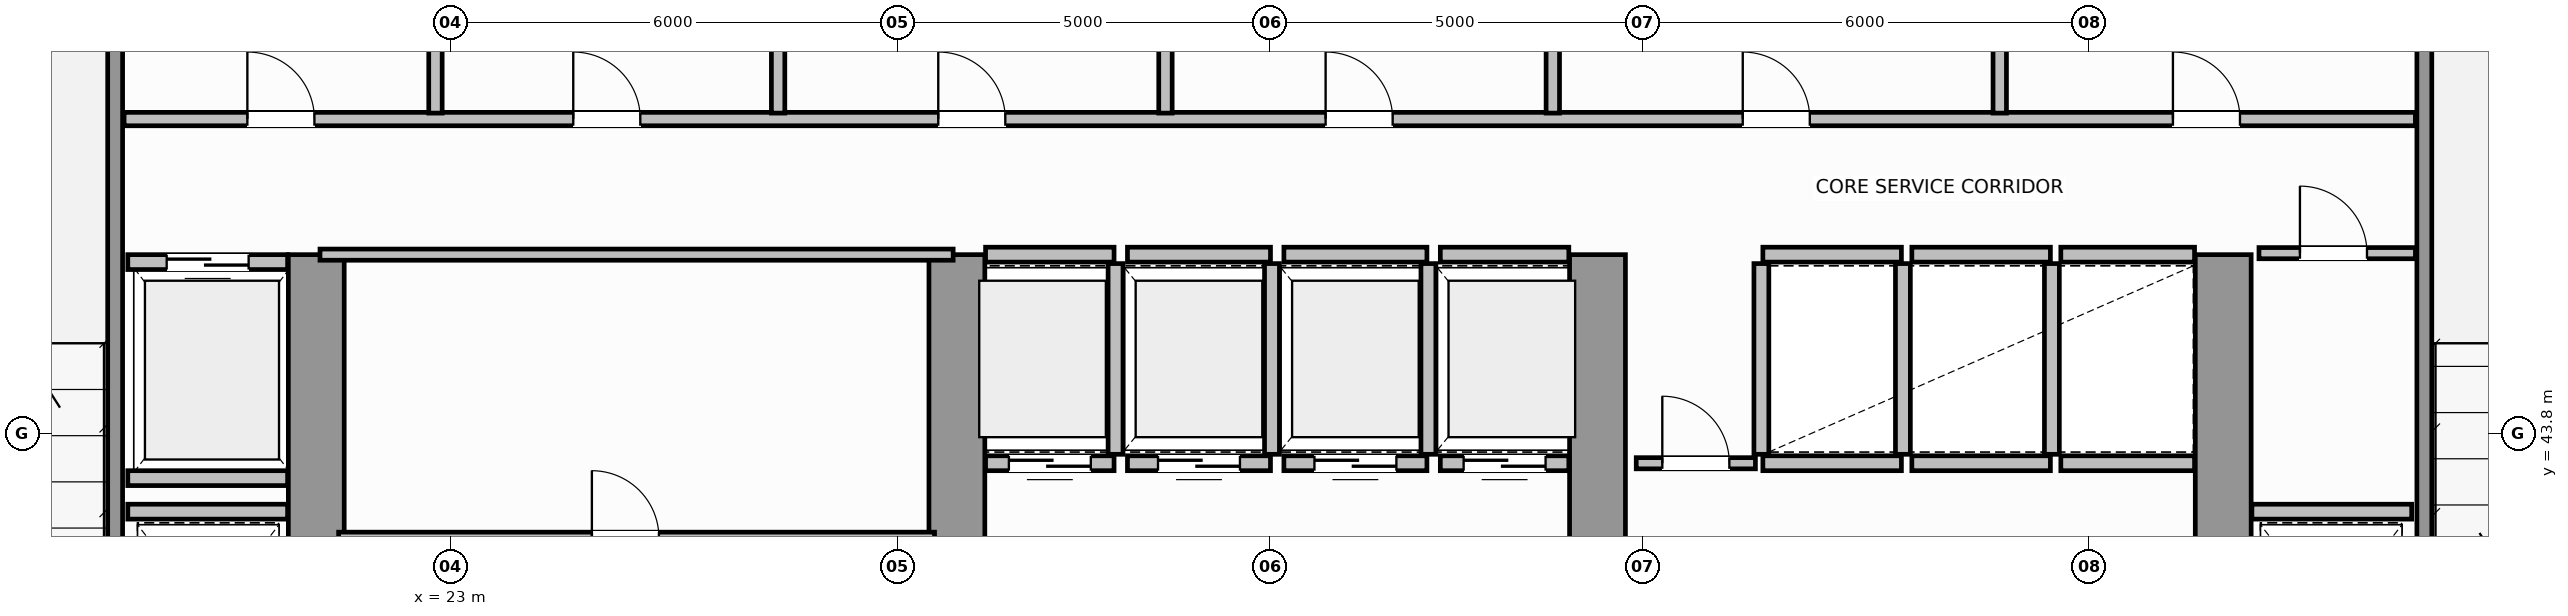
"""IFC4 building model, lengths in metres.
Left out: names, types, materials, properties, quantities, classifications, styles, units other than length and angle.
Written with IfcOpenShell. Run it as: python <this file> out.ifc"""

import sys

from ifc_helpers import new_model, si_unit, direction, frame, frame_2d, origin, place, context, subcontext, project, spatial, rectangle, extrude, source, transform, mapped, element, fill, save


model = new_model("IFC4")
c1 = context("Model", 3, precision=1e-05, world=origin(), true_north=direction((0.0, 1.0)))
c2 = subcontext(c1, "Body", "Model", "MODEL_VIEW")
j1 = project(units=[si_unit("LENGTHUNIT", "METRE"), si_unit("PLANEANGLEUNIT", "RADIAN")], contexts=[c1])
p1 = place(None, origin())
s1 = spatial("IfcSite", under=j1, at=p1, CompositionType="ELEMENT")
p2 = place(p1, origin())
s2 = spatial("IfcBuilding", under=s1, at=p2, CompositionType="ELEMENT")
p3 = place(p2, frame((0.0, 0.0, 141.4)))
s3 = spatial("IfcBuildingStorey", under=s2, at=p3, CompositionType="ELEMENT", Elevation=141.4)
for number, where, z_axis, x_axis in (
    (1, (21.2, 36.895, 0.0), (0.0, 0.0, 1.0), (0.0, 1.0, 0.0)),
    (2, (29.8, 36.895, 0.0), (0.0, 0.0, 1.0), (0.0, 1.0, 0.0)),
    (3, (38.4, 36.895, 0.0), (0.0, 0.0, 1.0), (0.0, 1.0, 0.0)),
    (4, (46.8, 36.895, 0.0), (0.0, 0.0, 1.0), (0.0, 1.0, 0.0)),
):
    element("IfcWall", number, at=place(p3, frame(where, z_axis=z_axis, x_axis=x_axis)), inside=s3, PredefinedType="SHEAR", context=c2, shape_type="SweptSolid", body=[
        extrude(rectangle(XDim=9.305, YDim=0.75, at=frame_2d((4.652, 0.0))), origin(), (0.0, 0.0, 1.0), 3.8),
    ])
for number, where, z_axis, x_axis in (
    (5, (18.5, 39.96, 0.0), (0.0, 0.0, 1.0), (0.0, 1.0, 0.0)),
    (6, (49.5, 39.96, 0.0), (0.0, 0.0, 1.0), (0.0, 1.0, 0.0)),
):
    element("IfcWall", number, at=place(p3, frame(where, z_axis=z_axis, x_axis=x_axis)), inside=s3, PredefinedType="SOLIDWALL", context=c2, shape_type="SweptSolid", body=[
        extrude(rectangle(XDim=9.93, YDim=0.2, at=frame_2d((4.965, 0.0))), origin(), (0.0, 0.0, 1.0), 3.8),
    ])
p4 = place(p3, frame((30.185, 43.4, 0.0), z_axis=(0.0, 0.0, 1.0), x_axis=(1.0, 0.0, 0.0)))
e7 = element("IfcWall", 7, at=p4, inside=s3, PredefinedType="SOLIDWALL", context=c2, shape_type="SweptSolid", body=[
    extrude(rectangle(XDim=1.725, YDim=0.2, at=frame_2d((0.862, 0.0))), origin(), (0.0, 0.0, 1.0), 3.58),
])
p5 = place(p4, frame((0.313, 0.0, 0.0)))
e8 = element("IfcOpeningElement", 8, at=p5, cuts=e7, PredefinedType="OPENING", context=c2, shape_type="SweptSolid", body=[
    extrude(rectangle(XDim=1.1, YDim=2.15, at=frame_2d((0.55, 1.075))), frame((0.0, 0.11, 0.0), z_axis=(0.0, -1.0, 0.0), x_axis=(1.0, 0.0, 0.0)), (0.0, 0.0, 1.0), 0.22),
])
p6 = place(p3, frame((30.185, 46.2, 0.0), z_axis=(0.0, 0.0, 1.0), x_axis=(1.0, 0.0, 0.0)))
e9 = element("IfcWall", 9, at=p6, inside=s3, PredefinedType="SOLIDWALL", context=c2, shape_type="SweptSolid", body=[
    extrude(rectangle(XDim=1.725, YDim=0.2, at=frame_2d((0.862, 0.0))), origin(), (0.0, 0.0, 1.0), 3.58),
])
p7 = place(p3, frame((31.93, 43.52, 0.0), z_axis=(0.0, 0.0, 1.0), x_axis=(0.0, 1.0, 0.0)))
e10 = element("IfcWall", 10, at=p7, inside=s3, PredefinedType="SOLIDWALL", context=c2, shape_type="SweptSolid", body=[
    extrude(rectangle(XDim=2.56, YDim=0.2, at=frame_2d((1.28, 0.0))), origin(), (0.0, 0.0, 1.0), 3.58),
])
p8 = place(p3, frame((32.09, 43.4, 0.0), z_axis=(0.0, 0.0, 1.0), x_axis=(1.0, 0.0, 0.0)))
e11 = element("IfcWall", 11, at=p8, inside=s3, PredefinedType="SOLIDWALL", context=c2, shape_type="SweptSolid", body=[
    extrude(rectangle(XDim=1.92, YDim=0.2, at=frame_2d((0.96, 0.0))), origin(), (0.0, 0.0, 1.0), 3.58),
])
p9 = place(p8, frame((0.41, 0.0, 0.0)))
e12 = element("IfcOpeningElement", 12, at=p9, cuts=e11, PredefinedType="OPENING", context=c2, shape_type="SweptSolid", body=[
    extrude(rectangle(XDim=1.1, YDim=2.15, at=frame_2d((0.55, 1.075))), frame((0.0, 0.11, 0.0), z_axis=(0.0, -1.0, 0.0), x_axis=(1.0, 0.0, 0.0)), (0.0, 0.0, 1.0), 0.22),
])
p10 = place(p3, frame((32.09, 46.2, 0.0), z_axis=(0.0, 0.0, 1.0), x_axis=(1.0, 0.0, 0.0)))
e13 = element("IfcWall", 13, at=p10, inside=s3, PredefinedType="SOLIDWALL", context=c2, shape_type="SweptSolid", body=[
    extrude(rectangle(XDim=1.92, YDim=0.2, at=frame_2d((0.96, 0.0))), origin(), (0.0, 0.0, 1.0), 3.58),
])
p11 = place(p3, frame((34.03, 43.52, 0.0), z_axis=(0.0, 0.0, 1.0), x_axis=(0.0, 1.0, 0.0)))
e14 = element("IfcWall", 14, at=p11, inside=s3, PredefinedType="SOLIDWALL", context=c2, shape_type="SweptSolid", body=[
    extrude(rectangle(XDim=2.56, YDim=0.2, at=frame_2d((1.28, 0.0))), origin(), (0.0, 0.0, 1.0), 3.58),
])
p12 = place(p3, frame((34.19, 43.4, 0.0), z_axis=(0.0, 0.0, 1.0), x_axis=(1.0, 0.0, 0.0)))
e15 = element("IfcWall", 15, at=p12, inside=s3, PredefinedType="SOLIDWALL", context=c2, shape_type="SweptSolid", body=[
    extrude(rectangle(XDim=1.92, YDim=0.2, at=frame_2d((0.96, 0.0))), origin(), (0.0, 0.0, 1.0), 3.58),
])
p13 = place(p12, frame((0.41, 0.0, 0.0)))
e16 = element("IfcOpeningElement", 16, at=p13, cuts=e15, PredefinedType="OPENING", context=c2, shape_type="SweptSolid", body=[
    extrude(rectangle(XDim=1.1, YDim=2.15, at=frame_2d((0.55, 1.075))), frame((0.0, 0.11, 0.0), z_axis=(0.0, -1.0, 0.0), x_axis=(1.0, 0.0, 0.0)), (0.0, 0.0, 1.0), 0.22),
])
p14 = place(p3, frame((34.19, 46.2, 0.0), z_axis=(0.0, 0.0, 1.0), x_axis=(1.0, 0.0, 0.0)))
e17 = element("IfcWall", 17, at=p14, inside=s3, PredefinedType="SOLIDWALL", context=c2, shape_type="SweptSolid", body=[
    extrude(rectangle(XDim=1.92, YDim=0.2, at=frame_2d((0.96, 0.0))), origin(), (0.0, 0.0, 1.0), 3.58),
])
p15 = place(p3, frame((36.13, 43.52, 0.0), z_axis=(0.0, 0.0, 1.0), x_axis=(0.0, 1.0, 0.0)))
e18 = element("IfcWall", 18, at=p15, inside=s3, PredefinedType="SOLIDWALL", context=c2, shape_type="SweptSolid", body=[
    extrude(rectangle(XDim=2.56, YDim=0.2, at=frame_2d((1.28, 0.0))), origin(), (0.0, 0.0, 1.0), 3.58),
])
p16 = place(p3, frame((36.29, 43.4, 0.0), z_axis=(0.0, 0.0, 1.0), x_axis=(1.0, 0.0, 0.0)))
e19 = element("IfcWall", 19, at=p16, inside=s3, PredefinedType="SOLIDWALL", context=c2, shape_type="SweptSolid", body=[
    extrude(rectangle(XDim=1.725, YDim=0.2, at=frame_2d((0.862, 0.0))), origin(), (0.0, 0.0, 1.0), 3.58),
])
p17 = place(p16, frame((0.313, 0.0, 0.0)))
e20 = element("IfcOpeningElement", 20, at=p17, cuts=e19, PredefinedType="OPENING", context=c2, shape_type="SweptSolid", body=[
    extrude(rectangle(XDim=1.1, YDim=2.15, at=frame_2d((0.55, 1.075))), frame((0.0, 0.11, 0.0), z_axis=(0.0, -1.0, 0.0), x_axis=(1.0, 0.0, 0.0)), (0.0, 0.0, 1.0), 0.22),
])
p18 = place(p3, frame((36.29, 46.2, 0.0), z_axis=(0.0, 0.0, 1.0), x_axis=(1.0, 0.0, 0.0)))
e21 = element("IfcWall", 21, at=p18, inside=s3, PredefinedType="SOLIDWALL", context=c2, shape_type="SweptSolid", body=[
    extrude(rectangle(XDim=1.725, YDim=0.2, at=frame_2d((0.862, 0.0))), origin(), (0.0, 0.0, 1.0), 3.58),
])
for number, where, z_axis, x_axis in (
    (22, (40.62, 43.4, 0.0), (0.0, 0.0, 1.0), (1.0, 0.0, 0.0)),
    (23, (40.62, 46.2, 0.0), (0.0, 0.0, 1.0), (1.0, 0.0, 0.0)),
):
    element("IfcWall", number, at=place(p3, frame(where, z_axis=z_axis, x_axis=x_axis)), inside=s3, PredefinedType="SOLIDWALL", context=c2, shape_type="SweptSolid", body=[
        extrude(rectangle(XDim=1.86, YDim=0.2, at=frame_2d((0.93, 0.0))), origin(), (0.0, 0.0, 1.0), 3.58),
    ])
for number, where, z_axis, x_axis in (
    (24, (40.6, 43.52, 0.0), (0.0, 0.0, 1.0), (0.0, 1.0, 0.0)),
    (25, (42.5, 43.52, 0.0), (0.0, 0.0, 1.0), (0.0, 1.0, 0.0)),
):
    element("IfcWall", number, at=place(p3, frame(where, z_axis=z_axis, x_axis=x_axis)), inside=s3, PredefinedType="SOLIDWALL", context=c2, shape_type="SweptSolid", body=[
        extrude(rectangle(XDim=2.56, YDim=0.2, at=frame_2d((1.28, 0.0))), origin(), (0.0, 0.0, 1.0), 3.58),
    ])
for number, where, z_axis, x_axis in (
    (26, (42.62, 43.4, 0.0), (0.0, 0.0, 1.0), (1.0, 0.0, 0.0)),
    (27, (42.62, 46.2, 0.0), (0.0, 0.0, 1.0), (1.0, 0.0, 0.0)),
):
    element("IfcWall", number, at=place(p3, frame(where, z_axis=z_axis, x_axis=x_axis)), inside=s3, PredefinedType="SOLIDWALL", context=c2, shape_type="SweptSolid", body=[
        extrude(rectangle(XDim=1.86, YDim=0.2, at=frame_2d((0.93, 0.0))), origin(), (0.0, 0.0, 1.0), 3.58),
    ])
p19 = place(p3, frame((44.5, 43.52, 0.0), z_axis=(0.0, 0.0, 1.0), x_axis=(0.0, 1.0, 0.0)))
e28 = element("IfcWall", 28, at=p19, inside=s3, PredefinedType="SOLIDWALL", context=c2, shape_type="SweptSolid", body=[
    extrude(rectangle(XDim=2.56, YDim=0.2, at=frame_2d((1.28, 0.0))), origin(), (0.0, 0.0, 1.0), 3.58),
])
for number, where, z_axis, x_axis in (
    (29, (44.62, 43.4, 0.0), (0.0, 0.0, 1.0), (1.0, 0.0, 0.0)),
    (30, (44.62, 46.2, 0.0), (0.0, 0.0, 1.0), (1.0, 0.0, 0.0)),
):
    element("IfcWall", number, at=place(p3, frame(where, z_axis=z_axis, x_axis=x_axis)), inside=s3, PredefinedType="SOLIDWALL", context=c2, shape_type="SweptSolid", body=[
        extrude(rectangle(XDim=1.795, YDim=0.2, at=frame_2d((0.897, 0.0))), origin(), (0.0, 0.0, 1.0), 3.58),
    ])
p20 = place(p3, frame((18.67, 46.1, 0.0), z_axis=(0.0, 0.0, 1.0), x_axis=(1.0, 0.0, 0.0)))
e31 = element("IfcWall", 31, at=p20, inside=s3, PredefinedType="SOLIDWALL", context=c2, shape_type="SweptSolid", body=[
    extrude(rectangle(XDim=2.145, YDim=0.2, at=frame_2d((1.073, 0.0))), origin(), (0.0, 0.0, 1.0), 3.58),
])
p21 = place(p20, frame((0.522, 0.0, 0.0)))
e32 = element("IfcOpeningElement", 32, at=p21, cuts=e31, PredefinedType="OPENING", context=c2, shape_type="SweptSolid", body=[
    extrude(rectangle(XDim=1.1, YDim=2.15, at=frame_2d((0.55, 1.075))), frame((0.0, 0.11, 0.0), z_axis=(0.0, -1.0, 0.0), x_axis=(1.0, 0.0, 0.0)), (0.0, 0.0, 1.0), 0.22),
])
for number, where, z_axis, x_axis in (
    (33, (18.67, 43.2, 0.0), (0.0, 0.0, 1.0), (1.0, 0.0, 0.0)),
    (34, (18.67, 42.75, 0.0), (0.0, 0.0, 1.0), (1.0, 0.0, 0.0)),
    (35, (47.185, 42.75, 0.0), (0.0, 0.0, 1.0), (1.0, 0.0, 0.0)),
):
    element("IfcWall", number, at=place(p3, frame(where, z_axis=z_axis, x_axis=x_axis)), inside=s3, PredefinedType="SOLIDWALL", context=c2, shape_type="SweptSolid", body=[
        extrude(rectangle(XDim=2.145, YDim=0.2, at=frame_2d((1.073, 0.0))), origin(), (0.0, 0.0, 1.0), 3.58),
    ])
p22 = place(p3, frame((21.25, 46.2, 0.0), z_axis=(0.0, 0.0, 1.0), x_axis=(1.0, 0.0, 0.0)))
e36 = element("IfcWall", 36, at=p22, inside=s3, PredefinedType="PARTITIONING", context=c2, shape_type="SweptSolid", body=[
    extrude(rectangle(XDim=8.5, YDim=0.15, at=frame_2d((4.25, 0.0))), origin(), (0.0, 0.0, 1.0), 3.58),
])
p23 = place(p3, frame((21.5, 42.4, 0.0), z_axis=(0.0, 0.0, 1.0), x_axis=(1.0, 0.0, 0.0)))
e37 = element("IfcWall", 37, at=p23, inside=s3, PredefinedType="PARTITIONING", context=c2, shape_type="SweptSolid", body=[
    extrude(rectangle(XDim=8.0, YDim=0.15, at=frame_2d((4.0, 0.0))), origin(), (0.0, 0.0, 1.0), 3.58),
])
p24 = place(p23, frame((3.4, 0.0, 0.0)))
e38 = element("IfcOpeningElement", 38, at=p24, cuts=e37, PredefinedType="OPENING", context=c2, shape_type="SweptSolid", body=[
    extrude(rectangle(XDim=0.9, YDim=2.1, at=frame_2d((0.45, 1.05))), frame((0.0, 0.085, 0.0), z_axis=(0.0, -1.0, 0.0), x_axis=(1.0, 0.0, 0.0)), (0.0, 0.0, 1.0), 0.17),
])
p25 = place(p3, frame((47.28, 46.22, 0.0), z_axis=(0.0, 0.0, 1.0), x_axis=(1.0, 0.0, 0.0)))
e39 = element("IfcWall", 39, at=p25, inside=s3, PredefinedType="PARTITIONING", context=c2, shape_type="SweptSolid", body=[
    extrude(rectangle(XDim=2.1, YDim=0.15, at=frame_2d((1.05, 0.0))), origin(), (0.0, 0.0, 1.0), 3.58),
])
p26 = place(p25, frame((0.55, 0.0, 0.0)))
e40 = element("IfcOpeningElement", 40, at=p26, cuts=e39, PredefinedType="OPENING", context=c2, shape_type="SweptSolid", body=[
    extrude(rectangle(XDim=0.9, YDim=2.1, at=frame_2d((0.45, 1.05))), frame((0.0, 0.085, 0.0), z_axis=(0.0, -1.0, 0.0), x_axis=(1.0, 0.0, 0.0)), (0.0, 0.0, 1.0), 0.17),
])
p27 = place(p3, frame((38.92, 43.4, 0.0), z_axis=(0.0, 0.0, 1.0), x_axis=(1.0, 0.0, 0.0)))
e41 = element("IfcWall", 41, at=p27, inside=s3, PredefinedType="PARTITIONING", context=c2, shape_type="SweptSolid", body=[
    extrude(rectangle(XDim=1.6, YDim=0.15, at=frame_2d((0.8, 0.0))), origin(), (0.0, 0.0, 1.0), 3.58),
])
p28 = place(p27, frame((0.35, 0.0, 0.0)))
e42 = element("IfcOpeningElement", 42, at=p28, cuts=e41, PredefinedType="OPENING", context=c2, shape_type="SweptSolid", body=[
    extrude(rectangle(XDim=0.9, YDim=2.1, at=frame_2d((0.45, 1.05))), frame((0.0, 0.085, 0.0), z_axis=(0.0, -1.0, 0.0), x_axis=(1.0, 0.0, 0.0)), (0.0, 0.0, 1.0), 0.17),
])
p29 = place(p3, frame((18.62, 48.02, 0.0), z_axis=(0.0, 0.0, 1.0), x_axis=(1.0, 0.0, 0.0)))
e43 = element("IfcWall", 43, at=p29, inside=s3, PredefinedType="PLUMBINGWALL", context=c2, shape_type="SweptSolid", body=[
    extrude(rectangle(XDim=30.76, YDim=0.18, at=frame_2d((15.38, 0.0))), origin(), (0.0, 0.0, 1.0), 3.58),
])
p30 = place(p29, frame((1.655, 0.0, 0.0)))
e44 = element("IfcOpeningElement", 44, at=p30, cuts=e43, PredefinedType="OPENING", context=c2, shape_type="SweptSolid", body=[
    extrude(rectangle(XDim=0.9, YDim=2.15, at=frame_2d((0.45, 1.075))), frame((0.0, 0.1, 0.0), z_axis=(0.0, -1.0, 0.0), x_axis=(1.0, 0.0, 0.0)), (0.0, 0.0, 1.0), 0.2),
])
p31 = place(p29, frame((6.03, 0.0, 0.0)))
e45 = element("IfcOpeningElement", 45, at=p31, cuts=e43, PredefinedType="OPENING", context=c2, shape_type="SweptSolid", body=[
    extrude(rectangle(XDim=0.9, YDim=2.15, at=frame_2d((0.45, 1.075))), frame((0.0, 0.1, 0.0), z_axis=(0.0, -1.0, 0.0), x_axis=(1.0, 0.0, 0.0)), (0.0, 0.0, 1.0), 0.2),
])
p32 = place(p29, frame((10.93, 0.0, 0.0)))
e46 = element("IfcOpeningElement", 46, at=p32, cuts=e43, PredefinedType="OPENING", context=c2, shape_type="SweptSolid", body=[
    extrude(rectangle(XDim=0.9, YDim=2.15, at=frame_2d((0.45, 1.075))), frame((0.0, 0.1, 0.0), z_axis=(0.0, -1.0, 0.0), x_axis=(1.0, 0.0, 0.0)), (0.0, 0.0, 1.0), 0.2),
])
p33 = place(p29, frame((16.13, 0.0, 0.0)))
e47 = element("IfcOpeningElement", 47, at=p33, cuts=e43, PredefinedType="OPENING", context=c2, shape_type="SweptSolid", body=[
    extrude(rectangle(XDim=0.9, YDim=2.15, at=frame_2d((0.45, 1.075))), frame((0.0, 0.1, 0.0), z_axis=(0.0, -1.0, 0.0), x_axis=(1.0, 0.0, 0.0)), (0.0, 0.0, 1.0), 0.2),
])
p34 = place(p29, frame((21.73, 0.0, 0.0)))
e48 = element("IfcOpeningElement", 48, at=p34, cuts=e43, PredefinedType="OPENING", context=c2, shape_type="SweptSolid", body=[
    extrude(rectangle(XDim=0.9, YDim=2.15, at=frame_2d((0.45, 1.075))), frame((0.0, 0.1, 0.0), z_axis=(0.0, -1.0, 0.0), x_axis=(1.0, 0.0, 0.0)), (0.0, 0.0, 1.0), 0.2),
])
p35 = place(p29, frame((27.505, 0.0, 0.0)))
e49 = element("IfcOpeningElement", 49, at=p35, cuts=e43, PredefinedType="OPENING", context=c2, shape_type="SweptSolid", body=[
    extrude(rectangle(XDim=0.9, YDim=2.15, at=frame_2d((0.45, 1.075))), frame((0.0, 0.1, 0.0), z_axis=(0.0, -1.0, 0.0), x_axis=(1.0, 0.0, 0.0)), (0.0, 0.0, 1.0), 0.2),
])
p36 = place(p3, frame((22.8, 48.1, 0.0), z_axis=(0.0, 0.0, 1.0), x_axis=(0.0, 1.0, 0.0)))
e50 = element("IfcWall", 50, at=p36, inside=s3, PredefinedType="PLUMBINGWALL", context=c2, shape_type="SweptSolid", body=[
    extrude(rectangle(XDim=2.13, YDim=0.18, at=frame_2d((1.065, 0.0))), origin(), (0.0, 0.0, 1.0), 2.87),
])
for number, where, z_axis, x_axis in (
    (51, (27.4, 48.1, 0.0), (0.0, 0.0, 1.0), (0.0, 1.0, 0.0)),
    (52, (32.6, 48.1, 0.0), (0.0, 0.0, 1.0), (0.0, 1.0, 0.0)),
    (53, (37.8, 48.1, 0.0), (0.0, 0.0, 1.0), (0.0, 1.0, 0.0)),
    (54, (43.8, 48.1, 0.0), (0.0, 0.0, 1.0), (0.0, 1.0, 0.0)),
):
    element("IfcWall", number, at=place(p3, frame(where, z_axis=z_axis, x_axis=x_axis)), inside=s3, PredefinedType="PLUMBINGWALL", context=c2, shape_type="SweptSolid", body=[
        extrude(rectangle(XDim=2.13, YDim=0.18, at=frame_2d((1.065, 0.0))), origin(), (0.0, 0.0, 1.0), 3.58),
    ])
m1 = source(origin(), c2, "Body", "SweptSolid", [
    extrude(rectangle(XDim=1.1, YDim=2.15, at=frame_2d((0.55, 1.075))), frame((0.0, 0.025, 0.0), z_axis=(0.0, -1.0, 0.0), x_axis=(1.0, 0.0, 0.0)), (0.0, 0.0, 1.0), 0.05),
])
p37 = place(p5, origin())
e55 = element("IfcDoor", 55, at=p37, inside=s3, OperationType="DOUBLE_DOOR_SLIDING", PredefinedType="DOOR", context=c2, shape_type="MappedRepresentation", body=[
    mapped(m1, transform((0.0, 0.0, 0.0), scale=1.0)),
])
fill(e8, e55)
p38 = place(p9, origin())
e56 = element("IfcDoor", 56, at=p38, inside=s3, OperationType="DOUBLE_DOOR_SLIDING", PredefinedType="DOOR", context=c2, shape_type="MappedRepresentation", body=[
    mapped(m1, transform((0.0, 0.0, 0.0), scale=1.0)),
])
fill(e12, e56)
p39 = place(p13, origin())
e57 = element("IfcDoor", 57, at=p39, inside=s3, OperationType="DOUBLE_DOOR_SLIDING", PredefinedType="DOOR", context=c2, shape_type="MappedRepresentation", body=[
    mapped(m1, transform((0.0, 0.0, 0.0), scale=1.0)),
])
fill(e16, e57)
p40 = place(p17, origin())
e58 = element("IfcDoor", 58, at=p40, inside=s3, OperationType="DOUBLE_DOOR_SLIDING", PredefinedType="DOOR", context=c2, shape_type="MappedRepresentation", body=[
    mapped(m1, transform((0.0, 0.0, 0.0), scale=1.0)),
])
fill(e20, e58)
p41 = place(p21, origin())
e59 = element("IfcDoor", 59, at=p41, inside=s3, OperationType="DOUBLE_DOOR_SLIDING", PredefinedType="DOOR", context=c2, shape_type="MappedRepresentation", body=[
    mapped(m1, transform((0.0, 0.0, 0.0), scale=1.0)),
])
fill(e32, e59)
m2 = source(origin(), c2, "Body", "SweptSolid", [
    extrude(rectangle(XDim=0.9, YDim=2.1, at=frame_2d((0.45, 1.05))), frame((0.0, 0.025, 0.0), z_axis=(0.0, -1.0, 0.0), x_axis=(1.0, 0.0, 0.0)), (0.0, 0.0, 1.0), 0.05),
])
p42 = place(p24, origin())
e60 = element("IfcDoor", 60, at=p42, inside=s3, OperationType="SINGLE_SWING_RIGHT", PredefinedType="DOOR", context=c2, shape_type="MappedRepresentation", body=[
    mapped(m2, transform((0.0, 0.0, 0.0), scale=1.0)),
])
fill(e38, e60)
p43 = place(p26, origin())
e61 = element("IfcDoor", 61, at=p43, inside=s3, OperationType="SINGLE_SWING_RIGHT", PredefinedType="DOOR", context=c2, shape_type="MappedRepresentation", body=[
    mapped(m2, transform((0.0, 0.0, 0.0), scale=1.0)),
])
fill(e40, e61)
p44 = place(p28, origin())
e62 = element("IfcDoor", 62, at=p44, inside=s3, OperationType="SINGLE_SWING_LEFT", PredefinedType="DOOR", context=c2, shape_type="MappedRepresentation", body=[
    mapped(m2, transform((0.0, 0.0, 0.0), scale=1.0)),
])
fill(e42, e62)
m3 = source(origin(), c2, "Body", "SweptSolid", [
    extrude(rectangle(XDim=0.9, YDim=2.15, at=frame_2d((0.45, 1.075))), frame((0.0, 0.025, 0.0), z_axis=(0.0, -1.0, 0.0), x_axis=(1.0, 0.0, 0.0)), (0.0, 0.0, 1.0), 0.05),
])
p45 = place(p30, origin())
e63 = element("IfcDoor", 63, at=p45, inside=s3, OperationType="SINGLE_SWING_LEFT", PredefinedType="DOOR", context=c2, shape_type="MappedRepresentation", body=[
    mapped(m3, transform((0.0, 0.0, 0.0), scale=1.0)),
])
fill(e44, e63)
p46 = place(p31, origin())
e64 = element("IfcDoor", 64, at=p46, inside=s3, OperationType="SINGLE_SWING_RIGHT", PredefinedType="DOOR", context=c2, shape_type="MappedRepresentation", body=[
    mapped(m3, transform((0.0, 0.0, 0.0), scale=1.0)),
])
fill(e45, e64)
p47 = place(p32, origin())
e65 = element("IfcDoor", 65, at=p47, inside=s3, OperationType="SINGLE_SWING_LEFT", PredefinedType="DOOR", context=c2, shape_type="MappedRepresentation", body=[
    mapped(m3, transform((0.0, 0.0, 0.0), scale=1.0)),
])
fill(e46, e65)
p48 = place(p33, origin())
e66 = element("IfcDoor", 66, at=p48, inside=s3, OperationType="SINGLE_SWING_RIGHT", PredefinedType="DOOR", context=c2, shape_type="MappedRepresentation", body=[
    mapped(m3, transform((0.0, 0.0, 0.0), scale=1.0)),
])
fill(e47, e66)
p49 = place(p34, origin())
e67 = element("IfcDoor", 67, at=p49, inside=s3, OperationType="SINGLE_SWING_LEFT", PredefinedType="DOOR", context=c2, shape_type="MappedRepresentation", body=[
    mapped(m3, transform((0.0, 0.0, 0.0), scale=1.0)),
])
fill(e48, e67)
p50 = place(p35, origin())
e68 = element("IfcDoor", 68, at=p50, inside=s3, OperationType="SINGLE_SWING_RIGHT", PredefinedType="DOOR", context=c2, shape_type="MappedRepresentation", body=[
    mapped(m3, transform((0.0, 0.0, 0.0), scale=1.0)),
])
fill(e49, e68)
save(model, sys.argv[1])
